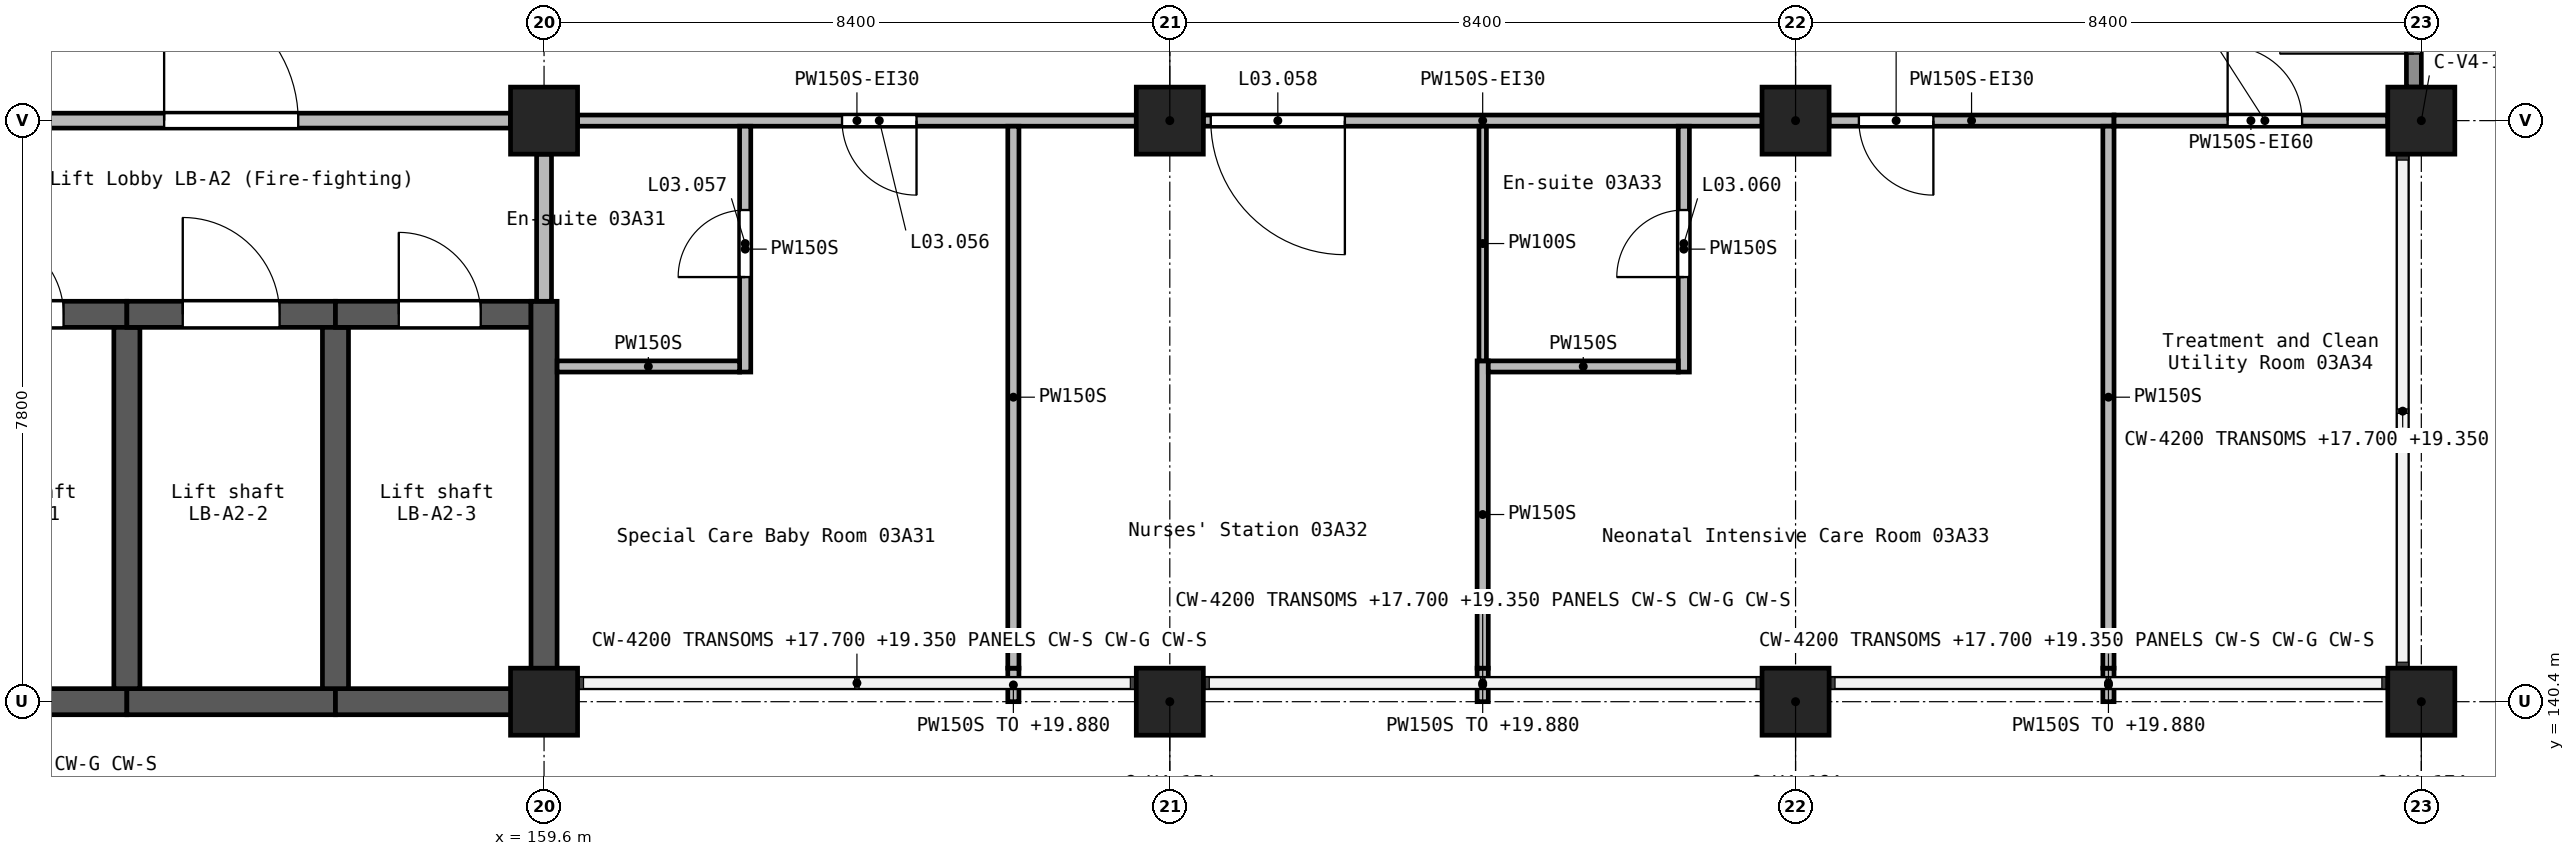
"""IFC4 building model, lengths in metres.
Left out: names, types, materials, properties, quantities, classifications, styles, units other than length and angle.
Written with IfcOpenShell. Run it as: python <this file> out.ifc"""

import sys

from ifc_helpers import new_model, si_unit, direction, frame, frame_2d, origin, origin_2d, place, context, subcontext, project, spatial, rectangle, extrude, element, fill, save


model = new_model("IFC4")
c1 = context("Model", 3, precision=1e-05, world=origin(), true_north=direction((0.0, 1.0)))
c2 = subcontext(c1, "Body", "Model", "MODEL_VIEW")
j1 = project(units=[si_unit("LENGTHUNIT", "METRE"), si_unit("PLANEANGLEUNIT", "RADIAN")], contexts=[c1])
p1 = place(None, origin())
s1 = spatial("IfcSite", under=j1, at=p1, CompositionType="ELEMENT")
p2 = place(p1, origin())
s2 = spatial("IfcBuilding", under=s1, at=p2, CompositionType="ELEMENT")
p3 = place(p2, frame((0.0, 0.0, 16.8)))
s3 = spatial("IfcBuildingStorey", under=s2, at=p3, CompositionType="ELEMENT", Elevation=16.8)
for number, where, z_axis, x_axis in (
    (1, (159.6, 140.4, 0.0), (0.0, 0.0, 1.0), (1.0, 0.0, 0.0)),
    (2, (159.6, 148.2, 0.0), (0.0, 0.0, 1.0), (1.0, 0.0, 0.0)),
    (3, (168.0, 140.4, 0.0), (0.0, 0.0, 1.0), (1.0, 0.0, 0.0)),
    (4, (168.0, 148.2, 0.0), (0.0, 0.0, 1.0), (1.0, 0.0, 0.0)),
    (5, (176.4, 140.4, 0.0), (0.0, 0.0, 1.0), (1.0, 0.0, 0.0)),
    (6, (176.4, 148.2, 0.0), (0.0, 0.0, 1.0), (1.0, 0.0, 0.0)),
    (7, (184.8, 140.4, 0.0), (0.0, 0.0, 1.0), (1.0, 0.0, 0.0)),
    (8, (184.8, 148.2, 0.0), (0.0, 0.0, 1.0), (1.0, 0.0, 0.0)),
):
    element("IfcColumn", number, at=place(p3, frame(where, z_axis=z_axis, x_axis=x_axis)), inside=s3, PredefinedType="COLUMN", context=c2, shape_type="SweptSolid", body=[
        extrude(rectangle(XDim=0.9, YDim=0.9, at=origin_2d()), origin(), (0.0, 0.0, 1.0), 4.2),
    ])
p4 = place(p3, frame((151.025, 145.6, 0.0), z_axis=(0.0, 0.0, 1.0), x_axis=(1.0, 0.0, 0.0)))
e9 = element("IfcWall", 9, at=p4, inside=s3, PredefinedType="SHEAR", context=c2, shape_type="SweptSolid", body=[
    extrude(rectangle(XDim=2.975, YDim=0.35, at=frame_2d((1.488, 0.0))), origin(), (0.0, 0.0, 1.0), 4.2),
])
p5 = place(p4, frame((1.025, 0.0, 0.0)))
e10 = element("IfcOpeningElement", 10, at=p5, cuts=e9, PredefinedType="OPENING", context=c2, shape_type="SweptSolid", body=[
    extrude(rectangle(XDim=1.1, YDim=2.1, at=frame_2d((0.55, 1.05))), frame((0.0, 0.185, 0.0), z_axis=(0.0, -1.0, 0.0), x_axis=(1.0, 0.0, 0.0)), (0.0, 0.0, 1.0), 0.37),
])
p6 = place(p3, frame((151.375, 140.4, 0.0), z_axis=(0.0, 0.0, 1.0), x_axis=(1.0, 0.0, 0.0)))
e11 = element("IfcWall", 11, at=p6, inside=s3, PredefinedType="SHEAR", context=c2, shape_type="SweptSolid", body=[
    extrude(rectangle(XDim=2.625, YDim=0.35, at=frame_2d((1.312, 0.0))), origin(), (0.0, 0.0, 1.0), 4.2),
])
p7 = place(p3, frame((154.0, 140.4, 0.0), z_axis=(0.0, 0.0, 1.0), x_axis=(1.0, 0.0, 0.0)))
e12 = element("IfcWall", 12, at=p7, inside=s3, PredefinedType="SHEAR", context=c2, shape_type="SweptSolid", body=[
    extrude(rectangle(XDim=2.8, YDim=0.35, at=frame_2d((1.4, 0.0))), origin(), (0.0, 0.0, 1.0), 4.2),
])
p8 = place(p3, frame((154.0, 140.575, 0.0), z_axis=(0.0, 0.0, 1.0), x_axis=(0.0, 1.0, 0.0)))
e13 = element("IfcWall", 13, at=p8, inside=s3, PredefinedType="SHEAR", context=c2, shape_type="SweptSolid", body=[
    extrude(rectangle(XDim=4.85, YDim=0.35, at=frame_2d((2.425, 0.0))), origin(), (0.0, 0.0, 1.0), 4.2),
])
p9 = place(p3, frame((154.0, 145.6, 0.0), z_axis=(0.0, 0.0, 1.0), x_axis=(1.0, 0.0, 0.0)))
e14 = element("IfcWall", 14, at=p9, inside=s3, PredefinedType="SHEAR", context=c2, shape_type="SweptSolid", body=[
    extrude(rectangle(XDim=2.8, YDim=0.35, at=frame_2d((1.4, 0.0))), origin(), (0.0, 0.0, 1.0), 4.2),
])
p10 = place(p9, frame((0.75, 0.0, 0.0)))
e15 = element("IfcOpeningElement", 15, at=p10, cuts=e14, PredefinedType="OPENING", context=c2, shape_type="SweptSolid", body=[
    extrude(rectangle(XDim=1.3, YDim=2.1, at=frame_2d((0.65, 1.05))), frame((0.0, 0.185, 0.0), z_axis=(0.0, -1.0, 0.0), x_axis=(1.0, 0.0, 0.0)), (0.0, 0.0, 1.0), 0.37),
])
p11 = place(p3, frame((156.8, 140.4, 0.0), z_axis=(0.0, 0.0, 1.0), x_axis=(1.0, 0.0, 0.0)))
e16 = element("IfcWall", 16, at=p11, inside=s3, PredefinedType="SHEAR", context=c2, shape_type="SweptSolid", body=[
    extrude(rectangle(XDim=2.625, YDim=0.35, at=frame_2d((1.312, 0.0))), origin(), (0.0, 0.0, 1.0), 4.2),
])
p12 = place(p3, frame((156.8, 140.575, 0.0), z_axis=(0.0, 0.0, 1.0), x_axis=(0.0, 1.0, 0.0)))
e17 = element("IfcWall", 17, at=p12, inside=s3, PredefinedType="SHEAR", context=c2, shape_type="SweptSolid", body=[
    extrude(rectangle(XDim=4.85, YDim=0.35, at=frame_2d((2.425, 0.0))), origin(), (0.0, 0.0, 1.0), 4.2),
])
p13 = place(p3, frame((156.8, 145.6, 0.0), z_axis=(0.0, 0.0, 1.0), x_axis=(1.0, 0.0, 0.0)))
e18 = element("IfcWall", 18, at=p13, inside=s3, PredefinedType="SHEAR", context=c2, shape_type="SweptSolid", body=[
    extrude(rectangle(XDim=2.625, YDim=0.35, at=frame_2d((1.312, 0.0))), origin(), (0.0, 0.0, 1.0), 4.2),
])
p14 = place(p13, frame((0.85, 0.0, 0.0)))
e19 = element("IfcOpeningElement", 19, at=p14, cuts=e18, PredefinedType="OPENING", context=c2, shape_type="SweptSolid", body=[
    extrude(rectangle(XDim=1.1, YDim=2.1, at=frame_2d((0.55, 1.05))), frame((0.0, 0.185, 0.0), z_axis=(0.0, -1.0, 0.0), x_axis=(1.0, 0.0, 0.0)), (0.0, 0.0, 1.0), 0.37),
])
p15 = place(p3, frame((159.6, 140.225, 0.0), z_axis=(0.0, 0.0, 1.0), x_axis=(0.0, 1.0, 0.0)))
e20 = element("IfcWall", 20, at=p15, inside=s3, PredefinedType="SHEAR", context=c2, shape_type="SweptSolid", body=[
    extrude(rectangle(XDim=5.55, YDim=0.35, at=frame_2d((2.775, 0.0))), origin(), (0.0, 0.0, 1.0), 4.2),
])
p16 = place(p3, frame((184.7, 148.65, 0.0), z_axis=(0.0, 0.0, 1.0), x_axis=(0.0, 1.0, 0.0)))
e21 = element("IfcWall", 21, at=p16, inside=s3, PredefinedType="STANDARD", context=c2, shape_type="SweptSolid", body=[
    extrude(rectangle(XDim=2.7, YDim=0.2, at=frame_2d((1.35, 0.0))), origin(), (0.0, 0.0, 1.0), 3.05),
])
p17 = place(p16, frame((0.45, 0.0, 0.0)))
e22 = element("IfcOpeningElement", 22, at=p17, cuts=e21, PredefinedType="OPENING", context=c2, shape_type="SweptSolid", body=[
    extrude(rectangle(XDim=1.8, YDim=2.4, at=frame_2d((0.9, 1.2))), frame((0.0, 0.11, 0.0), z_axis=(0.0, -1.0, 0.0), x_axis=(1.0, 0.0, 0.0)), (0.0, 0.0, 1.0), 0.22),
])
p18 = place(p3, frame((151.65, 148.2, 0.0), z_axis=(0.0, 0.0, 1.0), x_axis=(1.0, 0.0, 0.0)))
e23 = element("IfcWall", 23, at=p18, inside=s3, PredefinedType="SOLIDWALL", context=c2, shape_type="SweptSolid", body=[
    extrude(rectangle(XDim=7.5, YDim=0.2, at=frame_2d((3.75, 0.0))), origin(), (0.0, 0.0, 1.0), 3.9),
])
p19 = place(p18, frame((2.85, 0.0, 0.0)))
e24 = element("IfcOpeningElement", 24, at=p19, cuts=e23, PredefinedType="OPENING", context=c2, shape_type="SweptSolid", body=[
    extrude(rectangle(XDim=1.8, YDim=2.1, at=frame_2d((0.9, 1.05))), frame((0.0, 0.11, 0.0), z_axis=(0.0, -1.0, 0.0), x_axis=(1.0, 0.0, 0.0)), (0.0, 0.0, 1.0), 0.22),
])
p20 = place(p3, frame((159.6, 145.775, 0.0), z_axis=(0.0, 0.0, 1.0), x_axis=(0.0, 1.0, 0.0)))
e25 = element("IfcWall", 25, at=p20, inside=s3, PredefinedType="SOLIDWALL", context=c2, shape_type="SweptSolid", body=[
    extrude(rectangle(XDim=1.975, YDim=0.2, at=frame_2d((0.988, 0.0))), origin(), (0.0, 0.0, 1.0), 3.9),
])
p21 = place(p3, frame((180.675, 148.2, 0.0), z_axis=(0.0, 0.0, 1.0), x_axis=(-1.0, 0.0, 0.0)))
e26 = element("IfcWall", 26, at=p21, inside=s3, PredefinedType="PARTITIONING", context=c2, shape_type="SweptSolid", body=[
    extrude(rectangle(XDim=3.825, YDim=0.15, at=frame_2d((1.913, 0.0))), origin(), (0.0, 0.0, 1.0), 3.9),
])
p22 = place(p21, frame((2.425, 0.0, 0.0)))
e27 = element("IfcOpeningElement", 27, at=p22, cuts=e26, PredefinedType="OPENING", context=c2, shape_type="SweptSolid", body=[
    extrude(rectangle(XDim=1.0, YDim=2.1, at=frame_2d((0.5, 1.05))), frame((0.0, 0.085, 0.0), z_axis=(0.0, -1.0, 0.0), x_axis=(1.0, 0.0, 0.0)), (0.0, 0.0, 1.0), 0.17),
])
p23 = place(p3, frame((175.95, 148.2, 0.0), z_axis=(0.0, 0.0, 1.0), x_axis=(-1.0, 0.0, 0.0)))
e28 = element("IfcWall", 28, at=p23, inside=s3, PredefinedType="PARTITIONING", context=c2, shape_type="SweptSolid", body=[
    extrude(rectangle(XDim=7.5, YDim=0.15, at=frame_2d((3.75, 0.0))), origin(), (0.0, 0.0, 1.0), 3.9),
])
p24 = place(p23, frame((5.6, 0.0, 0.0)))
e29 = element("IfcOpeningElement", 29, at=p24, cuts=e28, PredefinedType="OPENING", context=c2, shape_type="SweptSolid", body=[
    extrude(rectangle(XDim=1.8, YDim=2.1, at=frame_2d((0.9, 1.05))), frame((0.0, 0.085, 0.0), z_axis=(0.0, -1.0, 0.0), x_axis=(1.0, 0.0, 0.0)), (0.0, 0.0, 1.0), 0.17),
])
p25 = place(p3, frame((167.55, 148.2, 0.0), z_axis=(0.0, 0.0, 1.0), x_axis=(-1.0, 0.0, 0.0)))
e30 = element("IfcWall", 30, at=p25, inside=s3, PredefinedType="PARTITIONING", context=c2, shape_type="SweptSolid", body=[
    extrude(rectangle(XDim=7.5, YDim=0.15, at=frame_2d((3.75, 0.0))), origin(), (0.0, 0.0, 1.0), 3.9),
])
p26 = place(p25, frame((2.95, 0.0, 0.0)))
e31 = element("IfcOpeningElement", 31, at=p26, cuts=e30, PredefinedType="OPENING", context=c2, shape_type="SweptSolid", body=[
    extrude(rectangle(XDim=1.0, YDim=2.1, at=frame_2d((0.5, 1.05))), frame((0.0, 0.085, 0.0), z_axis=(0.0, -1.0, 0.0), x_axis=(1.0, 0.0, 0.0)), (0.0, 0.0, 1.0), 0.17),
])
p27 = place(p3, frame((180.675, 148.2, 0.0), z_axis=(0.0, 0.0, 1.0), x_axis=(1.0, 0.0, 0.0)))
e32 = element("IfcWall", 32, at=p27, inside=s3, PredefinedType="PARTITIONING", context=c2, shape_type="SweptSolid", body=[
    extrude(rectangle(XDim=3.675, YDim=0.15, at=frame_2d((1.837, 0.0))), origin(), (0.0, 0.0, 1.0), 3.9),
])
p28 = place(p27, frame((1.525, 0.0, 0.0)))
e33 = element("IfcOpeningElement", 33, at=p28, cuts=e32, PredefinedType="OPENING", context=c2, shape_type="SweptSolid", body=[
    extrude(rectangle(XDim=1.0, YDim=2.1, at=frame_2d((0.5, 1.05))), frame((0.0, 0.085, 0.0), z_axis=(0.0, -1.0, 0.0), x_axis=(1.0, 0.0, 0.0)), (0.0, 0.0, 1.0), 0.17),
])
p29 = place(p3, frame((165.9, 140.4, 0.0), z_axis=(0.0, 0.0, 1.0), x_axis=(0.0, 1.0, 0.0)))
e34 = element("IfcWall", 34, at=p29, inside=s3, PredefinedType="PARTITIONING", context=c2, shape_type="SweptSolid", body=[
    extrude(rectangle(XDim=0.45, YDim=0.15, at=frame_2d((0.225, 0.0))), origin(), (0.0, 0.0, 1.0), 3.08),
])
p30 = place(p3, frame((165.9, 140.85, 0.0), z_axis=(0.0, 0.0, 1.0), x_axis=(0.0, 1.0, 0.0)))
e35 = element("IfcWall", 35, at=p30, inside=s3, PredefinedType="PARTITIONING", context=c2, shape_type="SweptSolid", body=[
    extrude(rectangle(XDim=7.275, YDim=0.15, at=frame_2d((3.637, 0.0))), origin(), (0.0, 0.0, 1.0), 3.9),
])
p31 = place(p3, frame((180.6, 140.4, 0.0), z_axis=(0.0, 0.0, 1.0), x_axis=(0.0, 1.0, 0.0)))
e36 = element("IfcWall", 36, at=p31, inside=s3, PredefinedType="PARTITIONING", context=c2, shape_type="SweptSolid", body=[
    extrude(rectangle(XDim=0.45, YDim=0.15, at=frame_2d((0.225, 0.0))), origin(), (0.0, 0.0, 1.0), 3.08),
])
p32 = place(p3, frame((180.6, 140.85, 0.0), z_axis=(0.0, 0.0, 1.0), x_axis=(0.0, 1.0, 0.0)))
e37 = element("IfcWall", 37, at=p32, inside=s3, PredefinedType="PARTITIONING", context=c2, shape_type="SweptSolid", body=[
    extrude(rectangle(XDim=7.275, YDim=0.15, at=frame_2d((3.637, 0.0))), origin(), (0.0, 0.0, 1.0), 3.9),
])
p33 = place(p3, frame((172.2, 140.4, 0.0), z_axis=(0.0, 0.0, 1.0), x_axis=(0.0, 1.0, 0.0)))
e38 = element("IfcWall", 38, at=p33, inside=s3, PredefinedType="PARTITIONING", context=c2, shape_type="SweptSolid", body=[
    extrude(rectangle(XDim=0.45, YDim=0.15, at=frame_2d((0.225, 0.0))), origin(), (0.0, 0.0, 1.0), 3.08),
])
p34 = place(p3, frame((172.2, 140.85, 0.0), z_axis=(0.0, 0.0, 1.0), x_axis=(0.0, 1.0, 0.0)))
e39 = element("IfcWall", 39, at=p34, inside=s3, PredefinedType="PARTITIONING", context=c2, shape_type="SweptSolid", body=[
    extrude(rectangle(XDim=4.125, YDim=0.15, at=frame_2d((2.062, 0.0))), origin(), (0.0, 0.0, 1.0), 3.9),
])
p35 = place(p3, frame((162.3, 144.825, 0.0), z_axis=(0.0, 0.0, 1.0), x_axis=(0.0, 1.0, 0.0)))
e40 = element("IfcWall", 40, at=p35, inside=s3, PredefinedType="PARTITIONING", context=c2, shape_type="SweptSolid", body=[
    extrude(rectangle(XDim=3.3, YDim=0.15, at=frame_2d((1.65, 0.0))), origin(), (0.0, 0.0, 1.0), 3.9),
])
p36 = place(p35, frame((1.275, 0.0, 0.0)))
e41 = element("IfcOpeningElement", 41, at=p36, cuts=e40, PredefinedType="OPENING", context=c2, shape_type="SweptSolid", body=[
    extrude(rectangle(XDim=0.9, YDim=2.1, at=frame_2d((0.45, 1.05))), frame((0.0, 0.085, 0.0), z_axis=(0.0, -1.0, 0.0), x_axis=(1.0, 0.0, 0.0)), (0.0, 0.0, 1.0), 0.17),
])
p37 = place(p3, frame((174.9, 144.825, 0.0), z_axis=(0.0, 0.0, 1.0), x_axis=(0.0, 1.0, 0.0)))
e42 = element("IfcWall", 42, at=p37, inside=s3, PredefinedType="PARTITIONING", context=c2, shape_type="SweptSolid", body=[
    extrude(rectangle(XDim=3.3, YDim=0.15, at=frame_2d((1.65, 0.0))), origin(), (0.0, 0.0, 1.0), 3.9),
])
p38 = place(p37, frame((1.275, 0.0, 0.0)))
e43 = element("IfcOpeningElement", 43, at=p38, cuts=e42, PredefinedType="OPENING", context=c2, shape_type="SweptSolid", body=[
    extrude(rectangle(XDim=0.9, YDim=2.1, at=frame_2d((0.45, 1.05))), frame((0.0, 0.085, 0.0), z_axis=(0.0, -1.0, 0.0), x_axis=(1.0, 0.0, 0.0)), (0.0, 0.0, 1.0), 0.17),
])
p39 = place(p3, frame((159.775, 144.9, 0.0), z_axis=(0.0, 0.0, 1.0), x_axis=(1.0, 0.0, 0.0)))
e44 = element("IfcWall", 44, at=p39, inside=s3, PredefinedType="PARTITIONING", context=c2, shape_type="SweptSolid", body=[
    extrude(rectangle(XDim=2.45, YDim=0.15, at=frame_2d((1.225, 0.0))), origin(), (0.0, 0.0, 1.0), 3.9),
])
p40 = place(p3, frame((172.275, 144.9, 0.0), z_axis=(0.0, 0.0, 1.0), x_axis=(1.0, 0.0, 0.0)))
e45 = element("IfcWall", 45, at=p40, inside=s3, PredefinedType="PARTITIONING", context=c2, shape_type="SweptSolid", body=[
    extrude(rectangle(XDim=2.55, YDim=0.15, at=frame_2d((1.275, 0.0))), origin(), (0.0, 0.0, 1.0), 3.9),
])
p41 = place(p3, frame((172.2, 144.975, 0.0), z_axis=(0.0, 0.0, 1.0), x_axis=(0.0, 1.0, 0.0)))
e46 = element("IfcWall", 46, at=p41, inside=s3, PredefinedType="PARTITIONING", context=c2, shape_type="SweptSolid", body=[
    extrude(rectangle(XDim=3.15, YDim=0.1, at=frame_2d((1.575, 0.0))), origin(), (0.0, 0.0, 1.0), 3.9),
])
p42 = place(p17, frame((1.8, 0.0, 0.0), z_axis=(0.0, 0.0, 1.0), x_axis=(-1.0, 0.0, 0.0)))
e47 = element("IfcDoor", 47, at=p42, inside=s3, OperationType="SINGLE_SWING_LEFT", PredefinedType="DOOR", context=c2, shape_type="SweptSolid", body=[
    extrude(rectangle(XDim=1.8, YDim=2.4, at=frame_2d((0.9, 1.2))), frame((0.0, 0.025, 0.0), z_axis=(0.0, -1.0, 0.0), x_axis=(1.0, 0.0, 0.0)), (0.0, 0.0, 1.0), 0.05),
])
fill(e22, e47)
p43 = place(p26, origin())
e48 = element("IfcDoor", 48, at=p43, inside=s3, OperationType="SINGLE_SWING_LEFT", PredefinedType="DOOR", context=c2, shape_type="SweptSolid", body=[
    extrude(rectangle(XDim=1.0, YDim=2.1, at=frame_2d((0.5, 1.05))), frame((0.0, 0.025, 0.0), z_axis=(0.0, -1.0, 0.0), x_axis=(1.0, 0.0, 0.0)), (0.0, 0.0, 1.0), 0.05),
])
fill(e31, e48)
p44 = place(p36, origin())
e49 = element("IfcDoor", 49, at=p44, inside=s3, OperationType="SINGLE_SWING_RIGHT", PredefinedType="DOOR", context=c2, shape_type="SweptSolid", body=[
    extrude(rectangle(XDim=0.9, YDim=2.1, at=frame_2d((0.45, 1.05))), frame((0.0, 0.025, 0.0), z_axis=(0.0, -1.0, 0.0), x_axis=(1.0, 0.0, 0.0)), (0.0, 0.0, 1.0), 0.05),
])
fill(e41, e49)
p45 = place(p24, origin())
e50 = element("IfcDoor", 50, at=p45, inside=s3, OperationType="DOUBLE_DOOR_SINGLE_SWING", PredefinedType="DOOR", context=c2, shape_type="SweptSolid", body=[
    extrude(rectangle(XDim=1.8, YDim=2.1, at=frame_2d((0.9, 1.05))), frame((0.0, 0.025, 0.0), z_axis=(0.0, -1.0, 0.0), x_axis=(1.0, 0.0, 0.0)), (0.0, 0.0, 1.0), 0.05),
])
fill(e29, e50)
p46 = place(p22, origin())
e51 = element("IfcDoor", 51, at=p46, inside=s3, OperationType="SINGLE_SWING_RIGHT", PredefinedType="DOOR", context=c2, shape_type="SweptSolid", body=[
    extrude(rectangle(XDim=1.0, YDim=2.1, at=frame_2d((0.5, 1.05))), frame((0.0, 0.025, 0.0), z_axis=(0.0, -1.0, 0.0), x_axis=(1.0, 0.0, 0.0)), (0.0, 0.0, 1.0), 0.05),
])
fill(e27, e51)
p47 = place(p38, origin())
e52 = element("IfcDoor", 52, at=p47, inside=s3, OperationType="SINGLE_SWING_RIGHT", PredefinedType="DOOR", context=c2, shape_type="SweptSolid", body=[
    extrude(rectangle(XDim=0.9, YDim=2.1, at=frame_2d((0.45, 1.05))), frame((0.0, 0.025, 0.0), z_axis=(0.0, -1.0, 0.0), x_axis=(1.0, 0.0, 0.0)), (0.0, 0.0, 1.0), 0.05),
])
fill(e43, e52)
p48 = place(p28, frame((1.0, 0.0, 0.0), z_axis=(0.0, 0.0, 1.0), x_axis=(-1.0, 0.0, 0.0)))
e53 = element("IfcDoor", 53, at=p48, inside=s3, OperationType="SINGLE_SWING_LEFT", PredefinedType="DOOR", context=c2, shape_type="SweptSolid", body=[
    extrude(rectangle(XDim=1.0, YDim=2.1, at=frame_2d((0.5, 1.05))), frame((0.0, 0.025, 0.0), z_axis=(0.0, -1.0, 0.0), x_axis=(1.0, 0.0, 0.0)), (0.0, 0.0, 1.0), 0.05),
])
fill(e33, e53)
p49 = place(p19, frame((1.8, 0.0, 0.0), z_axis=(0.0, 0.0, 1.0), x_axis=(-1.0, 0.0, 0.0)))
e54 = element("IfcDoor", 54, at=p49, inside=s3, OperationType="DOUBLE_DOOR_SINGLE_SWING", PredefinedType="DOOR", context=c2, shape_type="SweptSolid", body=[
    extrude(rectangle(XDim=1.8, YDim=2.1, at=frame_2d((0.9, 1.05))), frame((0.0, 0.025, 0.0), z_axis=(0.0, -1.0, 0.0), x_axis=(1.0, 0.0, 0.0)), (0.0, 0.0, 1.0), 0.05),
])
fill(e24, e54)
p50 = place(p5, origin())
e55 = element("IfcDoor", 55, at=p50, inside=s3, OperationType="DOUBLE_DOOR_SLIDING", PredefinedType="DOOR", context=c2, shape_type="SweptSolid", body=[
    extrude(rectangle(XDim=1.1, YDim=2.1, at=frame_2d((0.55, 1.05))), frame((0.0, 0.025, 0.0), z_axis=(0.0, -1.0, 0.0), x_axis=(1.0, 0.0, 0.0)), (0.0, 0.0, 1.0), 0.05),
])
fill(e10, e55)
p51 = place(p10, origin())
e56 = element("IfcDoor", 56, at=p51, inside=s3, OperationType="DOUBLE_DOOR_SLIDING", PredefinedType="DOOR", context=c2, shape_type="SweptSolid", body=[
    extrude(rectangle(XDim=1.3, YDim=2.1, at=frame_2d((0.65, 1.05))), frame((0.0, 0.025, 0.0), z_axis=(0.0, -1.0, 0.0), x_axis=(1.0, 0.0, 0.0)), (0.0, 0.0, 1.0), 0.05),
])
fill(e15, e56)
p52 = place(p14, origin())
e57 = element("IfcDoor", 57, at=p52, inside=s3, OperationType="DOUBLE_DOOR_SLIDING", PredefinedType="DOOR", context=c2, shape_type="SweptSolid", body=[
    extrude(rectangle(XDim=1.1, YDim=2.1, at=frame_2d((0.55, 1.05))), frame((0.0, 0.025, 0.0), z_axis=(0.0, -1.0, 0.0), x_axis=(1.0, 0.0, 0.0)), (0.0, 0.0, 1.0), 0.05),
])
fill(e19, e57)
save(model, sys.argv[1])
